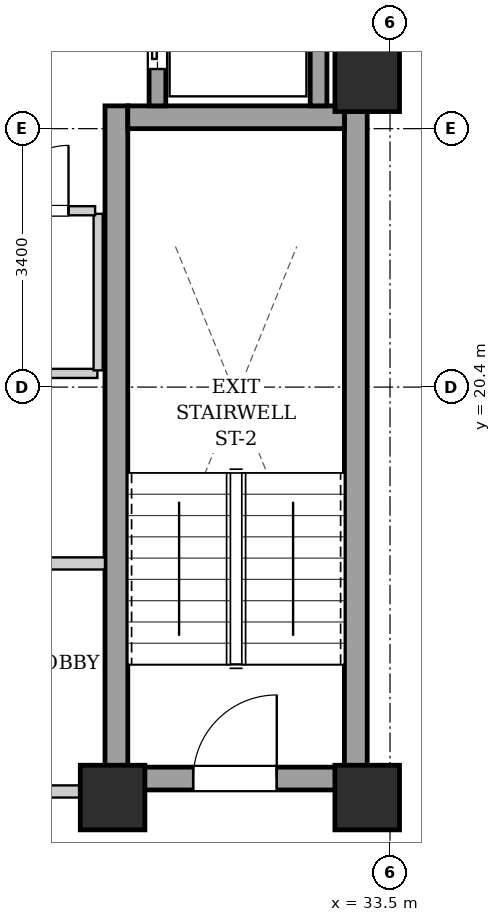
"""IFC4 building model, lengths in metres.
Left out: names, types, materials, properties, quantities, classifications, styles, units other than length and angle.
Written with IfcOpenShell. Run it as: python <this file> out.ifc"""

import sys

from ifc_helpers import new_model, si_unit, direction, frame, frame_2d, origin, origin_2d, place, context, subcontext, project, spatial, rectangle, extrude, element, fill, save


model = new_model("IFC4")
c1 = context("Model", 3, precision=1e-05, world=origin(), true_north=direction((0.0, 1.0)))
c2 = subcontext(c1, "Body", "Model", "MODEL_VIEW")
j1 = project(units=[si_unit("LENGTHUNIT", "METRE"), si_unit("PLANEANGLEUNIT", "RADIAN")], contexts=[c1])
p1 = place(None, origin())
s1 = spatial("IfcSite", under=j1, at=p1, CompositionType="ELEMENT")
p2 = place(p1, origin())
s2 = spatial("IfcBuilding", under=s1, at=p2, CompositionType="ELEMENT")
p3 = place(p2, frame((0.0, 0.0, 200.8)))
s3 = spatial("IfcBuildingStorey", under=s2, at=p3, CompositionType="ELEMENT", Elevation=200.8)
for number, where, z_axis, x_axis in (
    (1, (29.85, 15.0, 0.0), (0.0, 0.0, 1.0), (1.0, 0.0, 0.0)),
    (2, (33.2, 15.0, 0.0), (0.0, 0.0, 1.0), (1.0, 0.0, 0.0)),
    (3, (33.2, 24.45, 0.0), (0.0, 0.0, 1.0), (1.0, 0.0, 0.0)),
):
    element("IfcColumn", number, at=place(p3, frame(where, z_axis=z_axis, x_axis=x_axis)), inside=s3, PredefinedType="COLUMN", context=c2, shape_type="SweptSolid", body=[
        extrude(rectangle(XDim=0.85, YDim=0.85, at=origin_2d()), origin(), (0.0, 0.0, 1.0), 3.3),
    ])
for number, where, z_axis, x_axis in (
    (4, (29.9, 15.1, 0.0), (0.0, 0.0, 1.0), (0.0, 1.0, 0.0)),
    (5, (33.05, 15.1, 0.0), (0.0, 0.0, 1.0), (0.0, 1.0, 0.0)),
):
    element("IfcWall", number, at=place(p3, frame(where, z_axis=z_axis, x_axis=x_axis)), inside=s3, PredefinedType="SHEAR", context=c2, shape_type="SweptSolid", body=[
        extrude(rectangle(XDim=9.0, YDim=0.3, at=frame_2d((4.5, 0.0))), origin(), (0.0, 0.0, 1.0), 3.04),
    ])
p4 = place(p3, frame((30.05, 23.95, 0.0), z_axis=(0.0, 0.0, 1.0), x_axis=(1.0, 0.0, 0.0)))
e6 = element("IfcWall", 6, at=p4, inside=s3, PredefinedType="SHEAR", context=c2, shape_type="SweptSolid", body=[
    extrude(rectangle(XDim=2.85, YDim=0.3, at=frame_2d((1.425, 0.0))), origin(), (0.0, 0.0, 1.0), 3.04),
])
p5 = place(p3, frame((30.05, 15.25, 0.0), z_axis=(0.0, 0.0, 1.0), x_axis=(1.0, 0.0, 0.0)))
e7 = element("IfcWall", 7, at=p5, inside=s3, PredefinedType="SHEAR", context=c2, shape_type="SweptSolid", body=[
    extrude(rectangle(XDim=2.85, YDim=0.3, at=frame_2d((1.425, 0.0))), origin(), (0.0, 0.0, 1.0), 3.04),
])
p6 = place(p5, frame((0.86, 0.0, 0.0)))
e8 = element("IfcOpeningElement", 8, at=p6, cuts=e7, PredefinedType="OPENING", context=c2, shape_type="SweptSolid", body=[
    extrude(rectangle(XDim=1.1, YDim=2.05, at=frame_2d((0.55, 1.025))), frame((0.0, 0.16, 0.0), z_axis=(0.0, -1.0, 0.0), x_axis=(1.0, 0.0, 0.0)), (0.0, 0.0, 1.0), 0.32),
])
p7 = place(p3, frame((30.44, 24.1, 0.0), z_axis=(0.0, 0.0, 1.0), x_axis=(0.0, 1.0, 0.0)))
e9 = element("IfcWall", 9, at=p7, inside=s3, PredefinedType="SHEAR", context=c2, shape_type="SweptSolid", body=[
    extrude(rectangle(XDim=2.07, YDim=0.22, at=frame_2d((1.035, 0.0))), origin(), (0.0, 0.0, 1.0), 3.04),
])
p8 = place(p7, frame((0.485, 0.0, 0.0)))
e10 = element("IfcOpeningElement", 10, at=p8, cuts=e9, PredefinedType="OPENING", context=c2, shape_type="SweptSolid", body=[
    extrude(rectangle(XDim=1.1, YDim=2.15, at=frame_2d((0.55, 1.075))), frame((0.0, 0.12, 0.0), z_axis=(0.0, -1.0, 0.0), x_axis=(1.0, 0.0, 0.0)), (0.0, 0.0, 1.0), 0.24),
])
p9 = place(p3, frame((32.56, 24.1, 0.0), z_axis=(0.0, 0.0, 1.0), x_axis=(0.0, 1.0, 0.0)))
e11 = element("IfcWall", 11, at=p9, inside=s3, PredefinedType="SHEAR", context=c2, shape_type="SweptSolid", body=[
    extrude(rectangle(XDim=2.07, YDim=0.22, at=frame_2d((1.035, 0.0))), origin(), (0.0, 0.0, 1.0), 3.04),
])
p10 = place(p3, frame((21.25, 15.08, 0.0), z_axis=(0.0, 0.0, 1.0), x_axis=(1.0, 0.0, 0.0)))
e12 = element("IfcWall", 12, at=p10, inside=s3, PredefinedType="PARTITIONING", context=c2, shape_type="SweptSolid", body=[
    extrude(rectangle(XDim=8.5, YDim=0.16, at=frame_2d((4.25, 0.0))), origin(), (0.0, 0.0, 1.0), 2.556),
])
p11 = place(p10, frame((3.725, 0.0, 0.0)))
e13 = element("IfcOpeningElement", 13, at=p11, cuts=e12, PredefinedType="OPENING", context=c2, shape_type="SweptSolid", body=[
    extrude(rectangle(XDim=1.05, YDim=2.05, at=frame_2d((0.525, 1.025))), frame((0.0, 0.09, 0.0), z_axis=(0.0, -1.0, 0.0), x_axis=(1.0, 0.0, 0.0)), (0.0, 0.0, 1.0), 0.18),
])
p12 = place(p3, frame((28.65, 18.08, 0.0), z_axis=(0.0, 0.0, 1.0), x_axis=(1.0, 0.0, 0.0)))
e14 = element("IfcWall", 14, at=p12, inside=s3, PredefinedType="PARTITIONING", context=c2, shape_type="SweptSolid", body=[
    extrude(rectangle(XDim=1.1, YDim=0.16, at=frame_2d((0.55, 0.0))), origin(), (0.0, 0.0, 1.0), 3.04),
])
p13 = place(p3, frame((33.12, 24.12, 0.0), z_axis=(0.0, 0.0, 1.0), x_axis=(0.0, 1.0, 0.0)))
e15 = element("IfcWall", 15, at=p13, inside=s3, PredefinedType="PARTITIONING", context=c2, shape_type="SweptSolid", body=[
    extrude(rectangle(XDim=4.76, YDim=0.16, at=frame_2d((2.38, 0.0))), origin(), (0.0, 0.0, 1.0), 3.04),
])
p14 = place(p3, frame((22.3, 20.58, 0.0), z_axis=(0.0, 0.0, 1.0), x_axis=(1.0, 0.0, 0.0)))
e16 = element("IfcWall", 16, at=p14, inside=s3, PredefinedType="PARTITIONING", context=c2, shape_type="SweptSolid", body=[
    extrude(rectangle(XDim=7.35, YDim=0.12, at=frame_2d((3.675, 0.0))), origin(), (0.0, 0.0, 1.0), 3.04),
])
p15 = place(p3, frame((29.66, 20.62, 0.0), z_axis=(0.0, 0.0, 1.0), x_axis=(0.0, 1.0, 0.0)))
e17 = element("IfcWall", 17, at=p15, inside=s3, PredefinedType="PARTITIONING", context=c2, shape_type="SweptSolid", body=[
    extrude(rectangle(XDim=2.06, YDim=0.12, at=frame_2d((1.03, 0.0))), origin(), (0.0, 0.0, 1.0), 3.04),
])
p16 = place(p3, frame((22.35, 22.72, 0.0), z_axis=(0.0, 0.0, 1.0), x_axis=(1.0, 0.0, 0.0)))
e18 = element("IfcWall", 18, at=p16, inside=s3, PredefinedType="PARTITIONING", context=c2, shape_type="SweptSolid", body=[
    extrude(rectangle(XDim=7.27, YDim=0.12, at=frame_2d((3.635, 0.0))), origin(), (0.0, 0.0, 1.0), 3.04),
])
p17 = place(p16, frame((2.57, 0.0, 0.0)))
e19 = element("IfcOpeningElement", 19, at=p17, cuts=e18, PredefinedType="OPENING", context=c2, shape_type="SweptSolid", body=[
    extrude(rectangle(XDim=0.86, YDim=2.05, at=frame_2d((0.43, 1.025))), frame((0.0, 0.07, 0.0), z_axis=(0.0, -1.0, 0.0), x_axis=(1.0, 0.0, 0.0)), (0.0, 0.0, 1.0), 0.14),
])
p18 = place(p16, frame((6.06, 0.0, 0.0)))
e20 = element("IfcOpeningElement", 20, at=p18, cuts=e18, PredefinedType="OPENING", context=c2, shape_type="SweptSolid", body=[
    extrude(rectangle(XDim=0.86, YDim=2.05, at=frame_2d((0.43, 1.025))), frame((0.0, 0.07, 0.0), z_axis=(0.0, -1.0, 0.0), x_axis=(1.0, 0.0, 0.0)), (0.0, 0.0, 1.0), 0.14),
])
p19 = place(p6, origin())
e21 = element("IfcDoor", 21, at=p19, inside=s3, OperationType="SINGLE_SWING_RIGHT", PredefinedType="DOOR", context=c2, shape_type="SweptSolid", body=[
    extrude(rectangle(XDim=1.1, YDim=2.05, at=frame_2d((0.55, 1.025))), frame((0.0, 0.025, 0.0), z_axis=(0.0, -1.0, 0.0), x_axis=(1.0, 0.0, 0.0)), (0.0, 0.0, 1.0), 0.05),
])
fill(e8, e21)
p20 = place(p8, origin())
e22 = element("IfcDoor", 22, at=p20, inside=s3, OperationType="SLIDING_TO_LEFT", PredefinedType="DOOR", context=c2, shape_type="SweptSolid", body=[
    extrude(rectangle(XDim=1.1, YDim=2.15, at=frame_2d((0.55, 1.075))), frame((0.0, 0.025, 0.0), z_axis=(0.0, -1.0, 0.0), x_axis=(1.0, 0.0, 0.0)), (0.0, 0.0, 1.0), 0.05),
])
fill(e10, e22)
p21 = place(p18, origin())
e23 = element("IfcDoor", 23, at=p21, inside=s3, OperationType="SINGLE_SWING_RIGHT", PredefinedType="DOOR", context=c2, shape_type="SweptSolid", body=[
    extrude(rectangle(XDim=0.86, YDim=2.05, at=frame_2d((0.43, 1.025))), frame((0.0, 0.025, 0.0), z_axis=(0.0, -1.0, 0.0), x_axis=(1.0, 0.0, 0.0)), (0.0, 0.0, 1.0), 0.05),
])
fill(e20, e23)
save(model, sys.argv[1])
